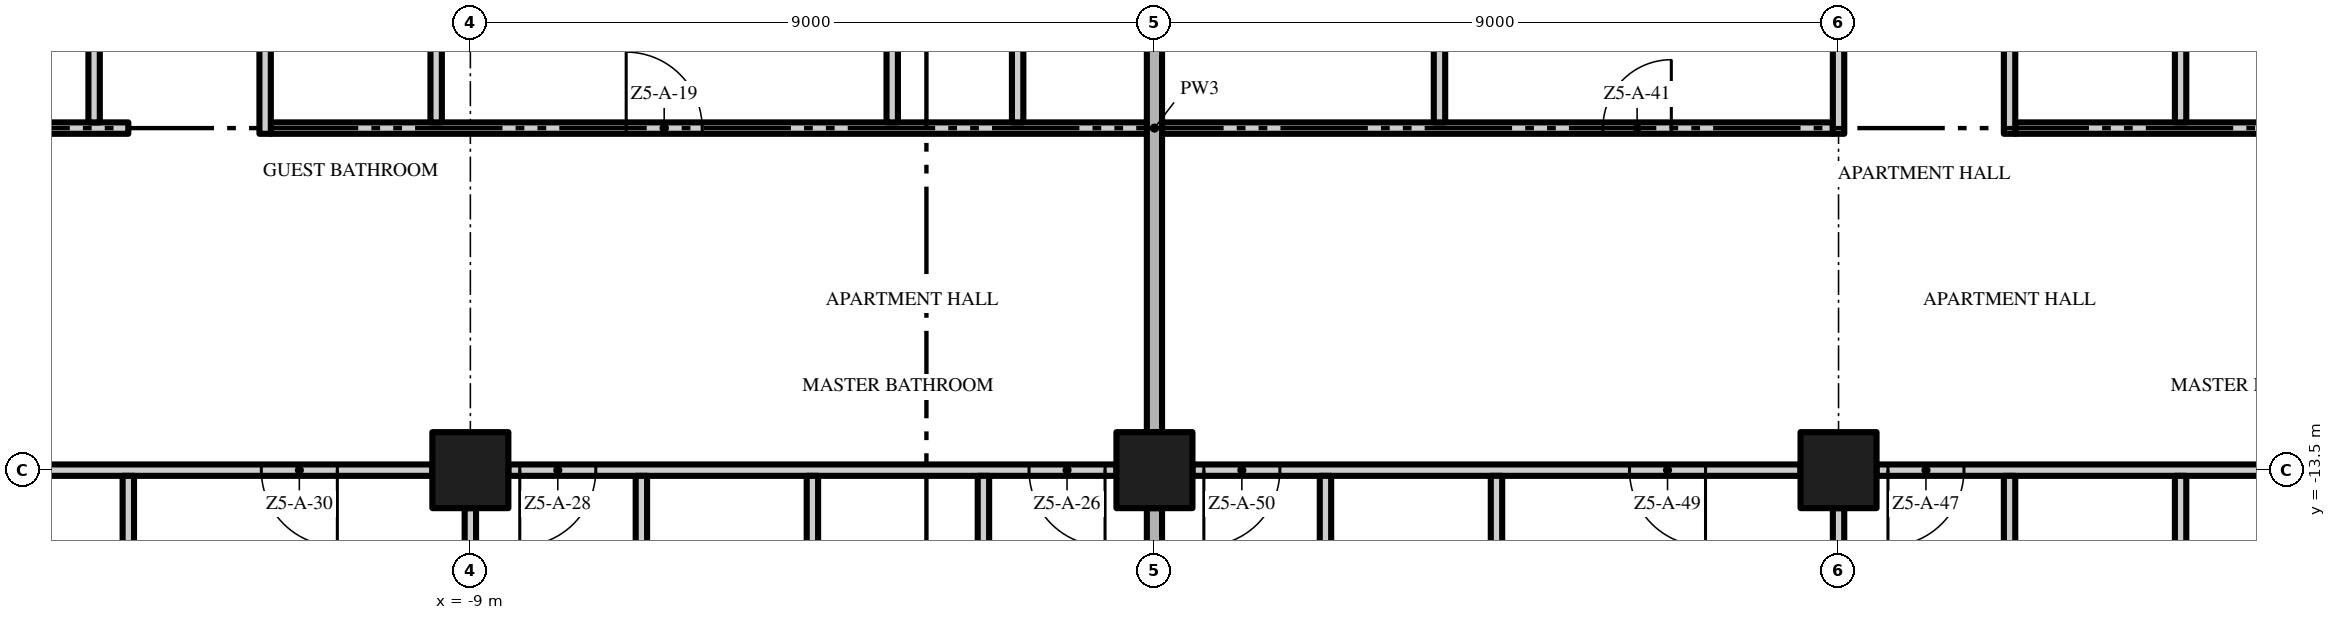
"""IFC4 building model, lengths in metres.
Left out: names, types, materials, properties, quantities, classifications, styles, units other than length and angle.
Written with IfcOpenShell. Run it as: python <this file> out.ifc"""

import sys

from ifc_helpers import new_model, si_unit, direction, frame, frame_2d, origin, origin_2d, place, context, subcontext, project, spatial, rectangle, extrude, element, fill, save


model = new_model("IFC4")
c1 = context("Model", 3, precision=1e-05, world=origin(), true_north=direction((0.0, 1.0)))
c2 = subcontext(c1, "Body", "Model", "MODEL_VIEW")
j1 = project(units=[si_unit("LENGTHUNIT", "METRE"), si_unit("PLANEANGLEUNIT", "RADIAN")], contexts=[c1])
p1 = place(None, origin())
s1 = spatial("IfcSite", under=j1, at=p1, CompositionType="ELEMENT")
p2 = place(p1, origin())
s2 = spatial("IfcBuilding", under=s1, at=p2, CompositionType="ELEMENT")
p3 = place(p2, frame((0.0, 0.0, 246.4)))
s3 = spatial("IfcBuildingStorey", under=s2, at=p3, CompositionType="ELEMENT", Elevation=246.4)
for number, where, z_axis, x_axis in (
    (1, (-9.0, -13.5, 0.0), (0.0, 0.0, 1.0), (1.0, 0.0, 0.0)),
    (2, (0.0, -13.5, 0.0), (0.0, 0.0, 1.0), (1.0, 0.0, 0.0)),
    (3, (9.0, -13.5, 0.0), (0.0, 0.0, 1.0), (1.0, 0.0, 0.0)),
):
    element("IfcColumn", number, at=place(p3, frame(where, z_axis=z_axis, x_axis=x_axis)), inside=s3, PredefinedType="COLUMN", context=c2, shape_type="SweptSolid", body=[
        extrude(rectangle(XDim=1.0, YDim=1.0, at=origin_2d()), origin(), (0.0, 0.0, 1.0), 3.5),
    ])
p4 = place(p3, frame((-9.5, -13.5, 0.0), z_axis=(0.0, 0.0, 1.0), x_axis=(-1.0, 0.0, 0.0)))
e4 = element("IfcWall", 4, at=p4, inside=s3, PredefinedType="PARTITIONING", context=c2, shape_type="SweptSolid", body=[
    extrude(rectangle(XDim=8.0, YDim=0.15, at=frame_2d((4.0, 0.0))), origin(), (0.0, 0.0, 1.0), 3.5),
])
p5 = place(p4, frame((1.25, 0.0, 0.0)))
e5 = element("IfcOpeningElement", 5, at=p5, cuts=e4, PredefinedType="OPENING", context=c2, shape_type="SweptSolid", body=[
    extrude(rectangle(XDim=1.0, YDim=2.4, at=frame_2d((0.5, 1.2))), frame((0.0, 0.085, 0.0), z_axis=(0.0, -1.0, 0.0), x_axis=(1.0, 0.0, 0.0)), (0.0, 0.0, 1.0), 0.17),
])
p6 = place(p4, frame((6.85, 0.0, 0.0)))
e6 = element("IfcOpeningElement", 6, at=p6, cuts=e4, PredefinedType="OPENING", context=c2, shape_type="SweptSolid", body=[
    extrude(rectangle(XDim=1.0, YDim=2.4, at=frame_2d((0.5, 1.2))), frame((0.0, 0.085, 0.0), z_axis=(0.0, -1.0, 0.0), x_axis=(1.0, 0.0, 0.0)), (0.0, 0.0, 1.0), 0.17),
])
p7 = place(p3, frame((-0.5, -13.5, 0.0), z_axis=(0.0, 0.0, 1.0), x_axis=(-1.0, 0.0, 0.0)))
e7 = element("IfcWall", 7, at=p7, inside=s3, PredefinedType="PARTITIONING", context=c2, shape_type="SweptSolid", body=[
    extrude(rectangle(XDim=8.0, YDim=0.15, at=frame_2d((4.0, 0.0))), origin(), (0.0, 0.0, 1.0), 3.5),
])
p8 = place(p7, frame((0.15, 0.0, 0.0)))
e8 = element("IfcOpeningElement", 8, at=p8, cuts=e7, PredefinedType="OPENING", context=c2, shape_type="SweptSolid", body=[
    extrude(rectangle(XDim=1.0, YDim=2.4, at=frame_2d((0.5, 1.2))), frame((0.0, 0.085, 0.0), z_axis=(0.0, -1.0, 0.0), x_axis=(1.0, 0.0, 0.0)), (0.0, 0.0, 1.0), 0.17),
])
p9 = place(p7, frame((6.85, 0.0, 0.0)))
e9 = element("IfcOpeningElement", 9, at=p9, cuts=e7, PredefinedType="OPENING", context=c2, shape_type="SweptSolid", body=[
    extrude(rectangle(XDim=1.0, YDim=2.4, at=frame_2d((0.5, 1.2))), frame((0.0, 0.085, 0.0), z_axis=(0.0, -1.0, 0.0), x_axis=(1.0, 0.0, 0.0)), (0.0, 0.0, 1.0), 0.17),
])
p10 = place(p3, frame((8.5, -13.5, 0.0), z_axis=(0.0, 0.0, 1.0), x_axis=(-1.0, 0.0, 0.0)))
e10 = element("IfcWall", 10, at=p10, inside=s3, PredefinedType="PARTITIONING", context=c2, shape_type="SweptSolid", body=[
    extrude(rectangle(XDim=8.0, YDim=0.15, at=frame_2d((4.0, 0.0))), origin(), (0.0, 0.0, 1.0), 3.5),
])
p11 = place(p10, frame((1.25, 0.0, 0.0)))
e11 = element("IfcOpeningElement", 11, at=p11, cuts=e10, PredefinedType="OPENING", context=c2, shape_type="SweptSolid", body=[
    extrude(rectangle(XDim=1.0, YDim=2.4, at=frame_2d((0.5, 1.2))), frame((0.0, 0.085, 0.0), z_axis=(0.0, -1.0, 0.0), x_axis=(1.0, 0.0, 0.0)), (0.0, 0.0, 1.0), 0.17),
])
p12 = place(p10, frame((6.85, 0.0, 0.0)))
e12 = element("IfcOpeningElement", 12, at=p12, cuts=e10, PredefinedType="OPENING", context=c2, shape_type="SweptSolid", body=[
    extrude(rectangle(XDim=1.0, YDim=2.4, at=frame_2d((0.5, 1.2))), frame((0.0, 0.085, 0.0), z_axis=(0.0, -1.0, 0.0), x_axis=(1.0, 0.0, 0.0)), (0.0, 0.0, 1.0), 0.17),
])
p13 = place(p3, frame((17.5, -13.5, 0.0), z_axis=(0.0, 0.0, 1.0), x_axis=(-1.0, 0.0, 0.0)))
e13 = element("IfcWall", 13, at=p13, inside=s3, PredefinedType="PARTITIONING", context=c2, shape_type="SweptSolid", body=[
    extrude(rectangle(XDim=8.0, YDim=0.15, at=frame_2d((4.0, 0.0))), origin(), (0.0, 0.0, 1.0), 3.5),
])
p14 = place(p13, frame((0.15, 0.0, 0.0)))
e14 = element("IfcOpeningElement", 14, at=p14, cuts=e13, PredefinedType="OPENING", context=c2, shape_type="SweptSolid", body=[
    extrude(rectangle(XDim=1.0, YDim=2.4, at=frame_2d((0.5, 1.2))), frame((0.0, 0.085, 0.0), z_axis=(0.0, -1.0, 0.0), x_axis=(1.0, 0.0, 0.0)), (0.0, 0.0, 1.0), 0.17),
])
p15 = place(p13, frame((6.85, 0.0, 0.0)))
e15 = element("IfcOpeningElement", 15, at=p15, cuts=e13, PredefinedType="OPENING", context=c2, shape_type="SweptSolid", body=[
    extrude(rectangle(XDim=1.0, YDim=2.4, at=frame_2d((0.5, 1.2))), frame((0.0, 0.085, 0.0), z_axis=(0.0, -1.0, 0.0), x_axis=(1.0, 0.0, 0.0)), (0.0, 0.0, 1.0), 0.17),
])
p16 = place(p3, frame((-26.7, -9.0, 0.0), z_axis=(0.0, 0.0, 1.0), x_axis=(1.0, 0.0, 0.0)))
e16 = element("IfcWall", 16, at=p16, inside=s3, PredefinedType="PARTITIONING", context=c2, shape_type="SweptSolid", body=[
    extrude(rectangle(XDim=13.2, YDim=0.15, at=frame_2d((6.6, 0.0))), origin(), (0.0, 0.0, 1.0), 3.5),
])
p17 = place(p3, frame((-11.625, -9.0, 0.0), z_axis=(0.0, 0.0, 1.0), x_axis=(1.0, 0.0, 0.0)))
e17 = element("IfcWall", 17, at=p17, inside=s3, PredefinedType="PARTITIONING", context=c2, shape_type="SweptSolid", body=[
    extrude(rectangle(XDim=11.525, YDim=0.15, at=frame_2d((5.763, 0.0))), origin(), (0.0, 0.0, 1.0), 3.5),
])
p18 = place(p17, frame((4.675, 0.0, 0.0)))
e18 = element("IfcOpeningElement", 18, at=p18, cuts=e17, PredefinedType="OPENING", context=c2, shape_type="SweptSolid", body=[
    extrude(rectangle(XDim=1.0, YDim=2.4, at=frame_2d((0.5, 1.2))), frame((0.0, 0.085, 0.0), z_axis=(0.0, -1.0, 0.0), x_axis=(1.0, 0.0, 0.0)), (0.0, 0.0, 1.0), 0.17),
])
p19 = place(p3, frame((0.1, -9.0, 0.0), z_axis=(0.0, 0.0, 1.0), x_axis=(1.0, 0.0, 0.0)))
e19 = element("IfcWall", 19, at=p19, inside=s3, PredefinedType="PARTITIONING", context=c2, shape_type="SweptSolid", body=[
    extrude(rectangle(XDim=8.825, YDim=0.15, at=frame_2d((4.412, 0.0))), origin(), (0.0, 0.0, 1.0), 3.5),
])
p20 = place(p19, frame((5.8, 0.0, 0.0)))
e20 = element("IfcOpeningElement", 20, at=p20, cuts=e19, PredefinedType="OPENING", context=c2, shape_type="SweptSolid", body=[
    extrude(rectangle(XDim=0.9, YDim=2.1, at=frame_2d((0.45, 1.05))), frame((0.0, 0.085, 0.0), z_axis=(0.0, -1.0, 0.0), x_axis=(1.0, 0.0, 0.0)), (0.0, 0.0, 1.0), 0.17),
])
p21 = place(p3, frame((11.325, -9.0, 0.0), z_axis=(0.0, 0.0, 1.0), x_axis=(1.0, 0.0, 0.0)))
e21 = element("IfcWall", 21, at=p21, inside=s3, PredefinedType="PARTITIONING", context=c2, shape_type="SweptSolid", body=[
    extrude(rectangle(XDim=15.375, YDim=0.15, at=frame_2d((7.688, 0.0))), origin(), (0.0, 0.0, 1.0), 3.5),
])
p22 = place(p21, frame((14.375, 0.0, 0.0)))
e22 = element("IfcOpeningElement", 22, at=p22, cuts=e21, PredefinedType="OPENING", context=c2, shape_type="SweptSolid", body=[
    extrude(rectangle(XDim=0.8, YDim=2.0, at=frame_2d((0.4, 1.0))), frame((0.0, 0.085, 0.0), z_axis=(0.0, -1.0, 0.0), x_axis=(1.0, 0.0, 0.0)), (0.0, 0.0, 1.0), 0.17),
])
p23 = place(p3, frame((-13.95, -8.925, 0.0), z_axis=(0.0, 0.0, 1.0), x_axis=(0.0, 1.0, 0.0)))
e23 = element("IfcWall", 23, at=p23, inside=s3, PredefinedType="PARTITIONING", context=c2, shape_type="SweptSolid", body=[
    extrude(rectangle(XDim=4.5, YDim=0.15, at=frame_2d((2.25, 0.0))), origin(), (0.0, 0.0, 1.0), 3.5),
])
p24 = place(p3, frame((-13.5, -22.2, 0.0), z_axis=(0.0, 0.0, 1.0), x_axis=(0.0, 1.0, 0.0)))
e24 = element("IfcWall", 24, at=p24, inside=s3, PredefinedType="PARTITIONING", context=c2, shape_type="SweptSolid", body=[
    extrude(rectangle(XDim=8.625, YDim=0.15, at=frame_2d((4.312, 0.0))), origin(), (0.0, 0.0, 1.0), 3.5),
])
p25 = place(p3, frame((-11.7, -4.425, 0.0), z_axis=(0.0, 0.0, 1.0), x_axis=(0.0, -1.0, 0.0)))
e25 = element("IfcWall", 25, at=p25, inside=s3, PredefinedType="PARTITIONING", context=c2, shape_type="SweptSolid", body=[
    extrude(rectangle(XDim=4.65, YDim=0.15, at=frame_2d((2.325, 0.0))), origin(), (0.0, 0.0, 1.0), 3.5),
])
p26 = place(p25, frame((1.875, 0.0, 0.0)))
e26 = element("IfcOpeningElement", 26, at=p26, cuts=e25, PredefinedType="OPENING", context=c2, shape_type="SweptSolid", body=[
    extrude(rectangle(XDim=0.9, YDim=2.1, at=frame_2d((0.45, 1.05))), frame((0.0, 0.085, 0.0), z_axis=(0.0, -1.0, 0.0), x_axis=(1.0, 0.0, 0.0)), (0.0, 0.0, 1.0), 0.17),
])
p27 = place(p3, frame((-9.45, -8.925, 0.0), z_axis=(0.0, 0.0, 1.0), x_axis=(0.0, 1.0, 0.0)))
e27 = element("IfcWall", 27, at=p27, inside=s3, PredefinedType="PARTITIONING", context=c2, shape_type="SweptSolid", body=[
    extrude(rectangle(XDim=3.925, YDim=0.15, at=frame_2d((1.962, 0.0))), origin(), (0.0, 0.0, 1.0), 3.5),
])
p28 = place(p3, frame((-9.0, -21.6, 0.0), z_axis=(0.0, 0.0, 1.0), x_axis=(0.0, 1.0, 0.0)))
e28 = element("IfcWall", 28, at=p28, inside=s3, PredefinedType="PARTITIONING", context=c2, shape_type="SweptSolid", body=[
    extrude(rectangle(XDim=7.6, YDim=0.15, at=frame_2d((3.8, 0.0))), origin(), (0.0, 0.0, 1.0), 3.5),
])
p29 = place(p3, frame((-6.75, -16.575, 0.0), z_axis=(0.0, 0.0, 1.0), x_axis=(0.0, 1.0, 0.0)))
e29 = element("IfcWall", 29, at=p29, inside=s3, PredefinedType="PARTITIONING", context=c2, shape_type="SweptSolid", body=[
    extrude(rectangle(XDim=3.0, YDim=0.15, at=frame_2d((1.5, 0.0))), origin(), (0.0, 0.0, 1.0), 3.5),
])
p30 = place(p3, frame((-4.5, -22.2, 0.0), z_axis=(0.0, 0.0, 1.0), x_axis=(0.0, 1.0, 0.0)))
e30 = element("IfcWall", 30, at=p30, inside=s3, PredefinedType="PARTITIONING", context=c2, shape_type="SweptSolid", body=[
    extrude(rectangle(XDim=8.625, YDim=0.15, at=frame_2d((4.312, 0.0))), origin(), (0.0, 0.0, 1.0), 3.5),
])
p31 = place(p3, frame((-3.45, -8.925, 0.0), z_axis=(0.0, 0.0, 1.0), x_axis=(0.0, 1.0, 0.0)))
e31 = element("IfcWall", 31, at=p31, inside=s3, PredefinedType="PARTITIONING", context=c2, shape_type="SweptSolid", body=[
    extrude(rectangle(XDim=4.35, YDim=0.15, at=frame_2d((2.175, 0.0))), origin(), (0.0, 0.0, 1.0), 3.5),
])
p32 = place(p3, frame((-2.25, -16.575, 0.0), z_axis=(0.0, 0.0, 1.0), x_axis=(0.0, 1.0, 0.0)))
e32 = element("IfcWall", 32, at=p32, inside=s3, PredefinedType="PARTITIONING", context=c2, shape_type="SweptSolid", body=[
    extrude(rectangle(XDim=3.0, YDim=0.15, at=frame_2d((1.5, 0.0))), origin(), (0.0, 0.0, 1.0), 3.5),
])
p33 = place(p3, frame((-1.8, -8.925, 0.0), z_axis=(0.0, 0.0, 1.0), x_axis=(0.0, 1.0, 0.0)))
e33 = element("IfcWall", 33, at=p33, inside=s3, PredefinedType="PARTITIONING", context=c2, shape_type="SweptSolid", body=[
    extrude(rectangle(XDim=4.35, YDim=0.15, at=frame_2d((2.175, 0.0))), origin(), (0.0, 0.0, 1.0), 3.5),
])
p34 = place(p3, frame((0.0, -21.6, 0.0), z_axis=(0.0, 0.0, 1.0), x_axis=(0.0, 1.0, 0.0)))
e34 = element("IfcWall", 34, at=p34, inside=s3, PredefinedType="PARTITIONING", context=c2, shape_type="SweptSolid", body=[
    extrude(rectangle(XDim=7.6, YDim=0.2, at=frame_2d((3.8, 0.0))), origin(), (0.0, 0.0, 1.0), 3.5),
])
p35 = place(p3, frame((0.0, -13.0, 0.0), z_axis=(0.0, 0.0, 1.0), x_axis=(0.0, 1.0, 0.0)))
e35 = element("IfcWall", 35, at=p35, inside=s3, PredefinedType="PARTITIONING", context=c2, shape_type="SweptSolid", body=[
    extrude(rectangle(XDim=8.0, YDim=0.2, at=frame_2d((4.0, 0.0))), origin(), (0.0, 0.0, 1.0), 3.5),
])
p36 = place(p3, frame((2.25, -16.575, 0.0), z_axis=(0.0, 0.0, 1.0), x_axis=(0.0, 1.0, 0.0)))
e36 = element("IfcWall", 36, at=p36, inside=s3, PredefinedType="PARTITIONING", context=c2, shape_type="SweptSolid", body=[
    extrude(rectangle(XDim=3.0, YDim=0.15, at=frame_2d((1.5, 0.0))), origin(), (0.0, 0.0, 1.0), 3.5),
])
p37 = place(p3, frame((3.75, -8.925, 0.0), z_axis=(0.0, 0.0, 1.0), x_axis=(0.0, 1.0, 0.0)))
e37 = element("IfcWall", 37, at=p37, inside=s3, PredefinedType="PARTITIONING", context=c2, shape_type="SweptSolid", body=[
    extrude(rectangle(XDim=4.35, YDim=0.15, at=frame_2d((2.175, 0.0))), origin(), (0.0, 0.0, 1.0), 3.5),
])
p38 = place(p37, frame((1.75, 0.0, 0.0)))
e38 = element("IfcOpeningElement", 38, at=p38, cuts=e37, PredefinedType="OPENING", context=c2, shape_type="SweptSolid", body=[
    extrude(rectangle(XDim=0.9, YDim=2.1, at=frame_2d((0.45, 1.05))), frame((0.0, 0.085, 0.0), z_axis=(0.0, -1.0, 0.0), x_axis=(1.0, 0.0, 0.0)), (0.0, 0.0, 1.0), 0.17),
])
p39 = place(p3, frame((4.5, -22.2, 0.0), z_axis=(0.0, 0.0, 1.0), x_axis=(0.0, 1.0, 0.0)))
e39 = element("IfcWall", 39, at=p39, inside=s3, PredefinedType="PARTITIONING", context=c2, shape_type="SweptSolid", body=[
    extrude(rectangle(XDim=8.625, YDim=0.15, at=frame_2d((4.312, 0.0))), origin(), (0.0, 0.0, 1.0), 3.5),
])
p40 = place(p3, frame((9.0, -21.6, 0.0), z_axis=(0.0, 0.0, 1.0), x_axis=(0.0, 1.0, 0.0)))
e40 = element("IfcWall", 40, at=p40, inside=s3, PredefinedType="PARTITIONING", context=c2, shape_type="SweptSolid", body=[
    extrude(rectangle(XDim=7.6, YDim=0.15, at=frame_2d((3.8, 0.0))), origin(), (0.0, 0.0, 1.0), 3.5),
])
p41 = place(p3, frame((9.0, -9.075, 0.0), z_axis=(0.0, 0.0, 1.0), x_axis=(0.0, 1.0, 0.0)))
e41 = element("IfcWall", 41, at=p41, inside=s3, PredefinedType="PARTITIONING", context=c2, shape_type="SweptSolid", body=[
    extrude(rectangle(XDim=4.075, YDim=0.15, at=frame_2d((2.038, 0.0))), origin(), (0.0, 0.0, 1.0), 3.5),
])
p42 = place(p3, frame((11.25, -16.575, 0.0), z_axis=(0.0, 0.0, 1.0), x_axis=(0.0, 1.0, 0.0)))
e42 = element("IfcWall", 42, at=p42, inside=s3, PredefinedType="PARTITIONING", context=c2, shape_type="SweptSolid", body=[
    extrude(rectangle(XDim=3.0, YDim=0.15, at=frame_2d((1.5, 0.0))), origin(), (0.0, 0.0, 1.0), 3.5),
])
p43 = place(p3, frame((11.25, -4.425, 0.0), z_axis=(0.0, 0.0, 1.0), x_axis=(0.0, -1.0, 0.0)))
e43 = element("IfcWall", 43, at=p43, inside=s3, PredefinedType="PARTITIONING", context=c2, shape_type="SweptSolid", body=[
    extrude(rectangle(XDim=4.65, YDim=0.15, at=frame_2d((2.325, 0.0))), origin(), (0.0, 0.0, 1.0), 3.5),
])
p44 = place(p43, frame((1.875, 0.0, 0.0)))
e44 = element("IfcOpeningElement", 44, at=p44, cuts=e43, PredefinedType="OPENING", context=c2, shape_type="SweptSolid", body=[
    extrude(rectangle(XDim=0.9, YDim=2.1, at=frame_2d((0.45, 1.05))), frame((0.0, 0.085, 0.0), z_axis=(0.0, -1.0, 0.0), x_axis=(1.0, 0.0, 0.0)), (0.0, 0.0, 1.0), 0.17),
])
p45 = place(p3, frame((13.5, -22.2, 0.0), z_axis=(0.0, 0.0, 1.0), x_axis=(0.0, 1.0, 0.0)))
e45 = element("IfcWall", 45, at=p45, inside=s3, PredefinedType="PARTITIONING", context=c2, shape_type="SweptSolid", body=[
    extrude(rectangle(XDim=8.625, YDim=0.15, at=frame_2d((4.312, 0.0))), origin(), (0.0, 0.0, 1.0), 3.5),
])
p46 = place(p3, frame((13.5, -8.925, 0.0), z_axis=(0.0, 0.0, 1.0), x_axis=(0.0, 1.0, 0.0)))
e46 = element("IfcWall", 46, at=p46, inside=s3, PredefinedType="PARTITIONING", context=c2, shape_type="SweptSolid", body=[
    extrude(rectangle(XDim=4.35, YDim=0.15, at=frame_2d((2.175, 0.0))), origin(), (0.0, 0.0, 1.0), 3.5),
])
p47 = place(p18, origin())
e47 = element("IfcDoor", 47, at=p47, inside=s3, OperationType="SINGLE_SWING_LEFT", PredefinedType="DOOR", context=c2, shape_type="SweptSolid", body=[
    extrude(rectangle(XDim=1.0, YDim=2.4, at=frame_2d((0.5, 1.2))), frame((0.0, 0.025, 0.0), z_axis=(0.0, -1.0, 0.0), x_axis=(1.0, 0.0, 0.0)), (0.0, 0.0, 1.0), 0.05),
])
fill(e18, e47)
p48 = place(p8, origin())
e48 = element("IfcDoor", 48, at=p48, inside=s3, OperationType="SINGLE_SWING_LEFT", PredefinedType="DOOR", context=c2, shape_type="SweptSolid", body=[
    extrude(rectangle(XDim=1.0, YDim=2.4, at=frame_2d((0.5, 1.2))), frame((0.0, 0.025, 0.0), z_axis=(0.0, -1.0, 0.0), x_axis=(1.0, 0.0, 0.0)), (0.0, 0.0, 1.0), 0.05),
])
fill(e8, e48)
p49 = place(p9, origin())
e49 = element("IfcDoor", 49, at=p49, inside=s3, OperationType="SINGLE_SWING_RIGHT", PredefinedType="DOOR", context=c2, shape_type="SweptSolid", body=[
    extrude(rectangle(XDim=1.0, YDim=2.4, at=frame_2d((0.5, 1.2))), frame((0.0, 0.025, 0.0), z_axis=(0.0, -1.0, 0.0), x_axis=(1.0, 0.0, 0.0)), (0.0, 0.0, 1.0), 0.05),
])
fill(e9, e49)
p50 = place(p5, origin())
e50 = element("IfcDoor", 50, at=p50, inside=s3, OperationType="SINGLE_SWING_LEFT", PredefinedType="DOOR", context=c2, shape_type="SweptSolid", body=[
    extrude(rectangle(XDim=1.0, YDim=2.4, at=frame_2d((0.5, 1.2))), frame((0.0, 0.025, 0.0), z_axis=(0.0, -1.0, 0.0), x_axis=(1.0, 0.0, 0.0)), (0.0, 0.0, 1.0), 0.05),
])
fill(e5, e50)
p51 = place(p20, origin())
e51 = element("IfcDoor", 51, at=p51, inside=s3, OperationType="SINGLE_SWING_RIGHT", PredefinedType="DOOR", context=c2, shape_type="SweptSolid", body=[
    extrude(rectangle(XDim=0.9, YDim=2.1, at=frame_2d((0.45, 1.05))), frame((0.0, 0.025, 0.0), z_axis=(0.0, -1.0, 0.0), x_axis=(1.0, 0.0, 0.0)), (0.0, 0.0, 1.0), 0.05),
])
fill(e20, e51)
p52 = place(p15, origin())
e52 = element("IfcDoor", 52, at=p52, inside=s3, OperationType="SINGLE_SWING_RIGHT", PredefinedType="DOOR", context=c2, shape_type="SweptSolid", body=[
    extrude(rectangle(XDim=1.0, YDim=2.4, at=frame_2d((0.5, 1.2))), frame((0.0, 0.025, 0.0), z_axis=(0.0, -1.0, 0.0), x_axis=(1.0, 0.0, 0.0)), (0.0, 0.0, 1.0), 0.05),
])
fill(e15, e52)
p53 = place(p11, origin())
e53 = element("IfcDoor", 53, at=p53, inside=s3, OperationType="SINGLE_SWING_LEFT", PredefinedType="DOOR", context=c2, shape_type="SweptSolid", body=[
    extrude(rectangle(XDim=1.0, YDim=2.4, at=frame_2d((0.5, 1.2))), frame((0.0, 0.025, 0.0), z_axis=(0.0, -1.0, 0.0), x_axis=(1.0, 0.0, 0.0)), (0.0, 0.0, 1.0), 0.05),
])
fill(e11, e53)
p54 = place(p12, origin())
e54 = element("IfcDoor", 54, at=p54, inside=s3, OperationType="SINGLE_SWING_RIGHT", PredefinedType="DOOR", context=c2, shape_type="SweptSolid", body=[
    extrude(rectangle(XDim=1.0, YDim=2.4, at=frame_2d((0.5, 1.2))), frame((0.0, 0.025, 0.0), z_axis=(0.0, -1.0, 0.0), x_axis=(1.0, 0.0, 0.0)), (0.0, 0.0, 1.0), 0.05),
])
fill(e12, e54)
save(model, sys.argv[1])
